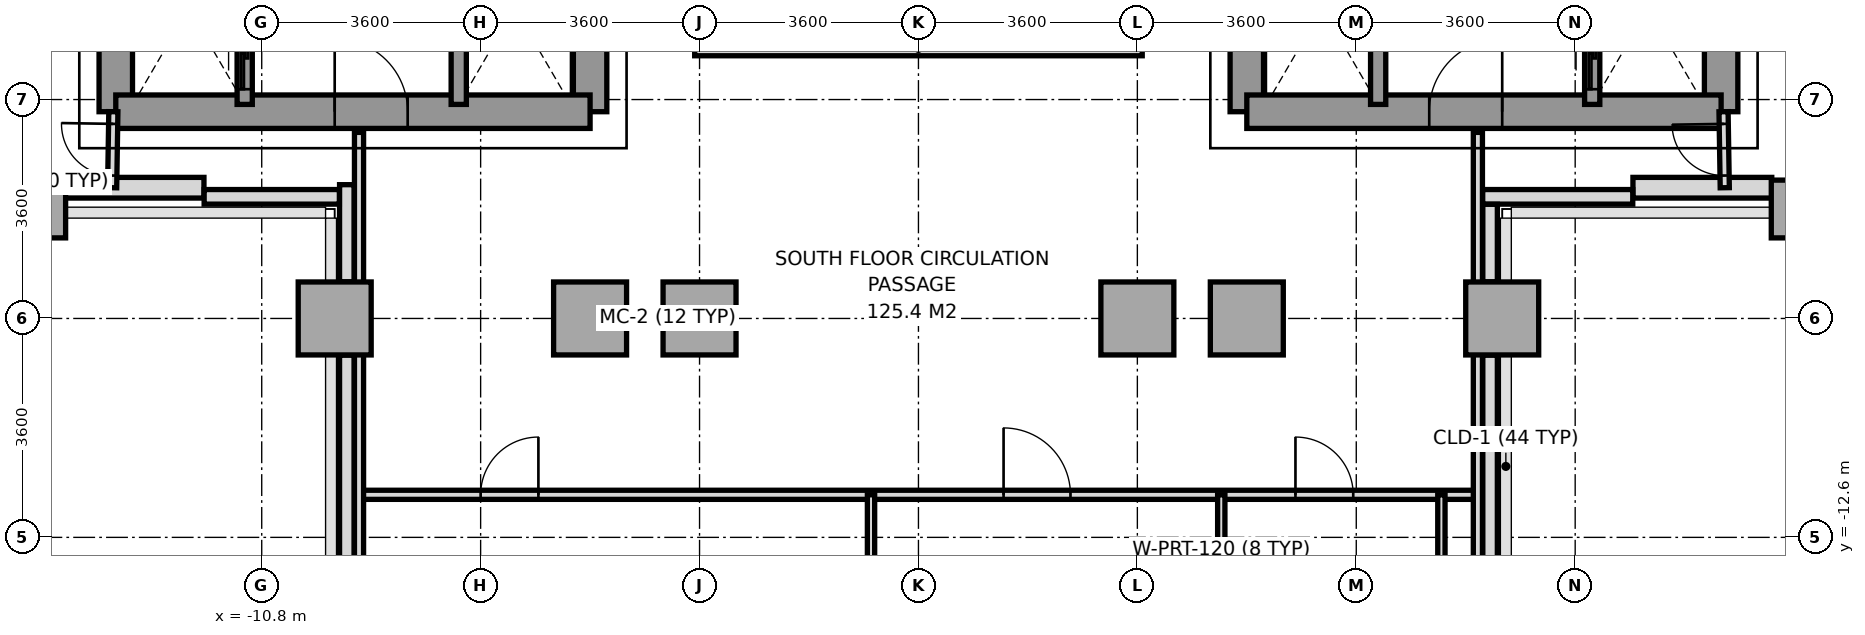
"""IFC4 building model, lengths in metres.
Left out: names, types, materials, properties, quantities, classifications, styles, units other than length and angle.
Written with IfcOpenShell. Run it as: python <this file> out.ifc"""

import sys

from ifc_helpers import new_model, si_unit, direction, frame, frame_2d, origin, origin_2d, place, context, subcontext, project, spatial, rectangle, extrude, source, transform, mapped, element, fill, save


model = new_model("IFC4")
c1 = context("Model", 3, precision=1e-05, world=origin(), true_north=direction((0.0, 1.0)))
c2 = subcontext(c1, "Body", "Model", "MODEL_VIEW")
j1 = project(units=[si_unit("LENGTHUNIT", "METRE"), si_unit("PLANEANGLEUNIT", "RADIAN")], contexts=[c1])
p1 = place(None, origin())
s1 = spatial("IfcSite", under=j1, at=p1, CompositionType="ELEMENT")
p2 = place(p1, origin())
s2 = spatial("IfcBuilding", under=s1, at=p2, CompositionType="ELEMENT")
p3 = place(p2, frame((0.0, 0.0, 85.0)))
s3 = spatial("IfcBuildingStorey", under=s2, at=p3, CompositionType="ELEMENT", Elevation=85.0)
m1 = source(origin(), c2, "Body", "SweptSolid", [
    extrude(rectangle(XDim=0.75, YDim=0.95, at=origin_2d()), origin(), (0.0, 0.0, 1.0), 3.14),
])
p4 = place(p3, frame((-14.4, -7.2, 0.0), z_axis=(0.0, 0.0, 1.0), x_axis=(1.0, 0.0, 0.0)))
e1 = element("IfcColumn", 1, at=p4, inside=s3, PredefinedType="COLUMN", context=c2, shape_type="MappedRepresentation", body=[
    mapped(m1, transform((0.0, 0.0, 0.0), x_axis=(1.0, 0.0, 0.0), y_axis=(0.0, 1.0, 0.0), z_axis=(0.0, 0.0, 1.0), scale=1.0)),
])
m2 = source(origin(), c2, "Body", "SweptSolid", [
    extrude(rectangle(XDim=1.2, YDim=1.2, at=origin_2d()), origin(), (0.0, 0.0, 1.0), 3.14),
])
for number, where, z_axis, x_axis in (
    (2, (-9.6, -9.0, 0.0), (0.0, 0.0, 1.0), (1.0, 0.0, 0.0)),
    (3, (-5.4, -9.0, 0.0), (0.0, 0.0, 1.0), (1.0, 0.0, 0.0)),
    (4, (-3.6, -9.0, 0.0), (0.0, 0.0, 1.0), (1.0, 0.0, 0.0)),
    (5, (3.6, -9.0, 0.0), (0.0, 0.0, 1.0), (1.0, 0.0, 0.0)),
    (6, (5.4, -9.0, 0.0), (0.0, 0.0, 1.0), (1.0, 0.0, 0.0)),
    (7, (9.6, -9.0, 0.0), (0.0, 0.0, 1.0), (1.0, 0.0, 0.0)),
):
    element("IfcColumn", number, at=place(p3, frame(where, z_axis=z_axis, x_axis=x_axis)), inside=s3, PredefinedType="COLUMN", context=c2, shape_type="MappedRepresentation", body=[
        mapped(m2, transform((0.0, 0.0, 0.0), x_axis=(1.0, 0.0, 0.0), y_axis=(0.0, 1.0, 0.0), z_axis=(0.0, 0.0, 1.0), scale=1.0)),
    ])
p5 = place(p3, frame((14.4, -7.2, 0.0), z_axis=(0.0, 0.0, 1.0), x_axis=(1.0, 0.0, 0.0)))
e8 = element("IfcColumn", 8, at=p5, inside=s3, PredefinedType="COLUMN", context=c2, shape_type="MappedRepresentation", body=[
    mapped(m1, transform((0.0, 0.0, 0.0), x_axis=(1.0, 0.0, 0.0), y_axis=(0.0, 1.0, 0.0), z_axis=(0.0, 0.0, 1.0), scale=1.0)),
])
for number, where, z_axis, x_axis in (
    (9, (-14.033, -6.85, 0.0), (0.0, 0.0, 1.0), (1.0, 0.0, 0.0)),
    (10, (11.75, -6.85, 0.0), (0.0, 0.0, 1.0), (1.0, 0.0, 0.0)),
):
    element("IfcWall", number, at=place(p3, frame(where, z_axis=z_axis, x_axis=x_axis)), inside=s3, PredefinedType="SOLIDWALL", context=c2, shape_type="SweptSolid", body=[
        extrude(rectangle(XDim=2.283, YDim=0.34, at=frame_2d((1.142, 0.0))), origin(), (0.0, 0.0, 1.0), 3.14),
    ])
p6 = place(p3, frame((11.747, -7.0, 0.0), z_axis=(0.0, 0.0, 1.0), x_axis=(-1.0, 0.0, 0.0)))
e11 = element("IfcWall", 11, at=p6, inside=s3, PredefinedType="PARAPET", context=c2, shape_type="SweptSolid", body=[
    extrude(rectangle(XDim=2.469, YDim=0.24, at=frame_2d((1.234, 0.0))), origin(), (0.0, 0.0, 1.0), 1.15),
])
p7 = place(p3, frame((9.4, -7.123, 0.0), z_axis=(0.0, 0.0, 1.0), x_axis=(0.0, -1.0, 0.0)))
e12 = element("IfcWall", 12, at=p7, inside=s3, PredefinedType="PARAPET", context=c2, shape_type="SweptSolid", body=[
    extrude(rectangle(XDim=1.274, YDim=0.24, at=frame_2d((0.637, 0.0))), origin(), (0.0, 0.0, 1.0), 1.15),
])
p8 = place(p3, frame((9.4, -9.603, 0.0), z_axis=(0.0, 0.0, 1.0), x_axis=(0.0, -1.0, 0.0)))
e13 = element("IfcWall", 13, at=p8, inside=s3, PredefinedType="PARAPET", context=c2, shape_type="SweptSolid", body=[
    extrude(rectangle(XDim=6.0, YDim=0.24, at=frame_2d((3.0, 0.0))), origin(), (0.0, 0.0, 1.0), 1.15),
])
p9 = place(p3, frame((-9.4, -15.358, 0.0), z_axis=(0.0, 0.0, 1.0), x_axis=(0.0, 1.0, 0.0)))
e14 = element("IfcWall", 14, at=p9, inside=s3, PredefinedType="PARAPET", context=c2, shape_type="SweptSolid", body=[
    extrude(rectangle(XDim=5.755, YDim=0.24, at=frame_2d((2.877, 0.0))), origin(), (0.0, 0.0, 1.0), 1.15),
])
p10 = place(p3, frame((-9.4, -8.397, 0.0), z_axis=(0.0, 0.0, 1.0), x_axis=(0.0, 1.0, 0.0)))
e15 = element("IfcWall", 15, at=p10, inside=s3, PredefinedType="PARAPET", context=c2, shape_type="SweptSolid", body=[
    extrude(rectangle(XDim=1.597, YDim=0.24, at=frame_2d((0.798, 0.0))), origin(), (0.0, 0.0, 1.0), 1.15),
])
p11 = place(p3, frame((-9.523, -7.0, 0.0), z_axis=(0.0, 0.0, 1.0), x_axis=(-1.0, 0.0, 0.0)))
e16 = element("IfcWall", 16, at=p11, inside=s3, PredefinedType="PARAPET", context=c2, shape_type="SweptSolid", body=[
    extrude(rectangle(XDim=2.224, YDim=0.24, at=frame_2d((1.112, 0.0))), origin(), (0.0, 0.0, 1.0), 1.15),
])
p12 = place(p3, frame((-13.2, -5.6, 0.0), z_axis=(0.0, 0.0, 1.0), x_axis=(0.0, 1.0, 0.0)))
e17 = element("IfcWall", 17, at=p12, inside=s3, PredefinedType="SHEAR", context=c2, shape_type="SweptSolid", body=[
    extrude(rectangle(XDim=11.2, YDim=0.55, at=frame_2d((5.6, 0.0))), origin(), (0.0, 0.0, 1.0), 3.14),
])
p13 = place(p3, frame((-5.4, -5.6, 0.0), z_axis=(0.0, 0.0, 1.0), x_axis=(0.0, 1.0, 0.0)))
e18 = element("IfcWall", 18, at=p13, inside=s3, PredefinedType="SHEAR", context=c2, shape_type="SweptSolid", body=[
    extrude(rectangle(XDim=12.5, YDim=0.55, at=frame_2d((6.25, 0.0))), origin(), (0.0, 0.0, 1.0), 3.14),
])
p14 = place(p13, frame((4.55, 0.0, 0.0)))
e19 = element("IfcOpeningElement", 19, at=p14, cuts=e18, PredefinedType="OPENING", context=c2, shape_type="SweptSolid", body=[
    extrude(rectangle(XDim=1.2, YDim=2.2, at=frame_2d((0.6, 1.1))), frame((0.0, 0.285, 0.0), z_axis=(0.0, -1.0, 0.0), x_axis=(1.0, 0.0, 0.0)), (0.0, 0.0, 1.0), 0.57),
])
p15 = place(p13, frame((6.86, 0.0, 0.0)))
e20 = element("IfcOpeningElement", 20, at=p15, cuts=e18, PredefinedType="OPENING", context=c2, shape_type="SweptSolid", body=[
    extrude(rectangle(XDim=0.8, YDim=2.1, at=frame_2d((0.4, 1.05))), frame((0.0, 0.285, 0.0), z_axis=(0.0, -1.0, 0.0), x_axis=(1.0, 0.0, 0.0)), (0.0, 0.0, 1.0), 0.57),
])
p16 = place(p13, frame((7.88, 0.0, 0.0)))
e21 = element("IfcOpeningElement", 21, at=p16, cuts=e18, PredefinedType="OPENING", context=c2, shape_type="SweptSolid", body=[
    extrude(rectangle(XDim=0.8, YDim=2.1, at=frame_2d((0.4, 1.05))), frame((0.0, 0.285, 0.0), z_axis=(0.0, -1.0, 0.0), x_axis=(1.0, 0.0, 0.0)), (0.0, 0.0, 1.0), 0.57),
])
p17 = place(p3, frame((-13.2, -5.6, 0.0), z_axis=(0.0, 0.0, 1.0), x_axis=(1.0, 0.0, 0.0)))
e22 = element("IfcWall", 22, at=p17, inside=s3, PredefinedType="SHEAR", context=c2, shape_type="SweptSolid", body=[
    extrude(rectangle(XDim=7.8, YDim=0.55, at=frame_2d((3.9, 0.0))), origin(), (0.0, 0.0, 1.0), 3.14),
])
p18 = place(p17, frame((3.6, 0.0, 0.0)))
e23 = element("IfcOpeningElement", 23, at=p18, cuts=e22, PredefinedType="OPENING", context=c2, shape_type="SweptSolid", body=[
    extrude(rectangle(XDim=1.2, YDim=2.2, at=frame_2d((0.6, 1.1))), frame((0.0, 0.285, 0.0), z_axis=(0.0, -1.0, 0.0), x_axis=(1.0, 0.0, 0.0)), (0.0, 0.0, 1.0), 0.57),
])
p19 = place(p3, frame((13.2, -5.6, 0.0), z_axis=(0.0, 0.0, 1.0), x_axis=(0.0, 1.0, 0.0)))
e24 = element("IfcWall", 24, at=p19, inside=s3, PredefinedType="SHEAR", context=c2, shape_type="SweptSolid", body=[
    extrude(rectangle(XDim=11.2, YDim=0.55, at=frame_2d((5.6, 0.0))), origin(), (0.0, 0.0, 1.0), 3.14),
])
p20 = place(p3, frame((5.4, -5.6, 0.0), z_axis=(0.0, 0.0, 1.0), x_axis=(0.0, 1.0, 0.0)))
e25 = element("IfcWall", 25, at=p20, inside=s3, PredefinedType="SHEAR", context=c2, shape_type="SweptSolid", body=[
    extrude(rectangle(XDim=12.5, YDim=0.55, at=frame_2d((6.25, 0.0))), origin(), (0.0, 0.0, 1.0), 3.14),
])
p21 = place(p20, frame((4.55, 0.0, 0.0)))
e26 = element("IfcOpeningElement", 26, at=p21, cuts=e25, PredefinedType="OPENING", context=c2, shape_type="SweptSolid", body=[
    extrude(rectangle(XDim=1.2, YDim=2.2, at=frame_2d((0.6, 1.1))), frame((0.0, 0.285, 0.0), z_axis=(0.0, -1.0, 0.0), x_axis=(1.0, 0.0, 0.0)), (0.0, 0.0, 1.0), 0.57),
])
p22 = place(p3, frame((5.4, -5.6, 0.0), z_axis=(0.0, 0.0, 1.0), x_axis=(1.0, 0.0, 0.0)))
e27 = element("IfcWall", 27, at=p22, inside=s3, PredefinedType="SHEAR", context=c2, shape_type="SweptSolid", body=[
    extrude(rectangle(XDim=7.8, YDim=0.55, at=frame_2d((3.9, 0.0))), origin(), (0.0, 0.0, 1.0), 3.14),
])
p23 = place(p22, frame((3.0, 0.0, 0.0)))
e28 = element("IfcOpeningElement", 28, at=p23, cuts=e27, PredefinedType="OPENING", context=c2, shape_type="SweptSolid", body=[
    extrude(rectangle(XDim=1.2, YDim=2.2, at=frame_2d((0.6, 1.1))), frame((0.0, 0.285, 0.0), z_axis=(0.0, -1.0, 0.0), x_axis=(1.0, 0.0, 0.0)), (0.0, 0.0, 1.0), 0.57),
])
p24 = place(p3, frame((-11.08, -5.48, 0.0), z_axis=(0.0, 0.0, 1.0), x_axis=(0.0, 1.0, 0.0)))
e29 = element("IfcWall", 29, at=p24, inside=s3, PredefinedType="SOLIDWALL", context=c2, shape_type="SweptSolid", body=[
    extrude(rectangle(XDim=1.6, YDim=0.25, at=frame_2d((0.8, 0.0))), origin(), (0.0, 0.0, 1.0), 3.14),
])
p25 = place(p24, frame((0.25, 0.0, 0.0)))
e30 = element("IfcOpeningElement", 30, at=p25, cuts=e29, PredefinedType="OPENING", context=c2, shape_type="SweptSolid", body=[
    extrude(rectangle(XDim=1.1, YDim=2.2, at=frame_2d((0.55, 1.1))), frame((0.0, 0.135, 0.0), z_axis=(0.0, -1.0, 0.0), x_axis=(1.0, 0.0, 0.0)), (0.0, 0.0, 1.0), 0.27),
])
p26 = place(p3, frame((11.08, -5.48, 0.0), z_axis=(0.0, 0.0, 1.0), x_axis=(0.0, 1.0, 0.0)))
e31 = element("IfcWall", 31, at=p26, inside=s3, PredefinedType="SOLIDWALL", context=c2, shape_type="SweptSolid", body=[
    extrude(rectangle(XDim=1.6, YDim=0.25, at=frame_2d((0.8, 0.0))), origin(), (0.0, 0.0, 1.0), 3.14),
])
p27 = place(p26, frame((0.25, 0.0, 0.0)))
e32 = element("IfcOpeningElement", 32, at=p27, cuts=e31, PredefinedType="OPENING", context=c2, shape_type="SweptSolid", body=[
    extrude(rectangle(XDim=1.1, YDim=2.2, at=frame_2d((0.55, 1.1))), frame((0.0, 0.135, 0.0), z_axis=(0.0, -1.0, 0.0), x_axis=(1.0, 0.0, 0.0)), (0.0, 0.0, 1.0), 0.27),
])
for number, where, z_axis, x_axis in (
    (33, (-7.56, -5.48, 0.0), (0.0, 0.0, 1.0), (0.0, 1.0, 0.0)),
    (34, (7.56, -5.48, 0.0), (0.0, 0.0, 1.0), (0.0, 1.0, 0.0)),
):
    element("IfcWall", number, at=place(p3, frame(where, z_axis=z_axis, x_axis=x_axis)), inside=s3, PredefinedType="SOLIDWALL", context=c2, shape_type="SweptSolid", body=[
        extrude(rectangle(XDim=1.6, YDim=0.25, at=frame_2d((0.8, 0.0))), origin(), (0.0, 0.0, 1.0), 3.14),
    ])
p28 = place(p3, frame((-9.2, -11.9, 0.0), z_axis=(0.0, 0.0, 1.0), x_axis=(1.0, 0.0, 0.0)))
e35 = element("IfcWall", 35, at=p28, inside=s3, PredefinedType="PARTITIONING", context=c2, shape_type="SweptSolid", body=[
    extrude(rectangle(XDim=18.4, YDim=0.15, at=frame_2d((9.2, 0.0))), origin(), (0.0, 0.0, 1.0), 3.14),
])
p29 = place(p28, frame((15.4, 0.0, 0.0)))
e36 = element("IfcOpeningElement", 36, at=p29, cuts=e35, PredefinedType="OPENING", context=c2, shape_type="SweptSolid", body=[
    extrude(rectangle(XDim=0.95, YDim=2.15, at=frame_2d((0.475, 1.075))), frame((0.0, 0.085, 0.0), z_axis=(0.0, -1.0, 0.0), x_axis=(1.0, 0.0, 0.0)), (0.0, 0.0, 1.0), 0.17),
])
p30 = place(p28, frame((2.0, 0.0, 0.0)))
e37 = element("IfcOpeningElement", 37, at=p30, cuts=e35, PredefinedType="OPENING", context=c2, shape_type="SweptSolid", body=[
    extrude(rectangle(XDim=0.95, YDim=2.15, at=frame_2d((0.475, 1.075))), frame((0.0, 0.085, 0.0), z_axis=(0.0, -1.0, 0.0), x_axis=(1.0, 0.0, 0.0)), (0.0, 0.0, 1.0), 0.17),
])
p31 = place(p28, frame((10.6, 0.0, 0.0)))
e38 = element("IfcOpeningElement", 38, at=p31, cuts=e35, PredefinedType="OPENING", context=c2, shape_type="SweptSolid", body=[
    extrude(rectangle(XDim=1.1, YDim=2.2, at=frame_2d((0.55, 1.1))), frame((0.0, 0.085, 0.0), z_axis=(0.0, -1.0, 0.0), x_axis=(1.0, 0.0, 0.0)), (0.0, 0.0, 1.0), 0.17),
])
for number, where, z_axis, x_axis in (
    (39, (-9.2, -15.68, 0.0), (0.0, 0.0, 1.0), (0.0, 1.0, 0.0)),
    (40, (9.2, -15.68, 0.0), (0.0, 0.0, 1.0), (0.0, 1.0, 0.0)),
):
    element("IfcWall", number, at=place(p3, frame(where, z_axis=z_axis, x_axis=x_axis)), inside=s3, PredefinedType="PARTITIONING", context=c2, shape_type="SweptSolid", body=[
        extrude(rectangle(XDim=9.74, YDim=0.15, at=frame_2d((4.87, 0.0))), origin(), (0.0, 0.0, 1.0), 2.59),
    ])
p32 = place(p3, frame((4.98, -15.4, 0.0), z_axis=(0.0, 0.0, 1.0), x_axis=(0.0, 1.0, 0.0)))
e41 = element("IfcWall", 41, at=p32, inside=s3, PredefinedType="PARTITIONING", context=c2, shape_type="SweptSolid", body=[
    extrude(rectangle(XDim=3.5, YDim=0.12, at=frame_2d((1.75, 0.0))), origin(), (0.0, 0.0, 1.0), 2.59),
])
p33 = place(p3, frame((8.6, -15.4, 0.0), z_axis=(0.0, 0.0, 1.0), x_axis=(0.0, 1.0, 0.0)))
e42 = element("IfcWall", 42, at=p33, inside=s3, PredefinedType="PARTITIONING", context=c2, shape_type="SweptSolid", body=[
    extrude(rectangle(XDim=3.5, YDim=0.12, at=frame_2d((1.75, 0.0))), origin(), (0.0, 0.0, 1.0), 3.14),
])
p34 = place(p3, frame((-0.78, -24.65, 0.0), z_axis=(0.0, 0.0, 1.0), x_axis=(0.0, 1.0, 0.0)))
e43 = element("IfcWall", 43, at=p34, inside=s3, PredefinedType="PARTITIONING", context=c2, shape_type="SweptSolid", body=[
    extrude(rectangle(XDim=12.75, YDim=0.12, at=frame_2d((6.375, 0.0))), origin(), (0.0, 0.0, 1.0), 2.59),
])
p35 = place(p3, frame((-13.26, -6.85, 0.0), z_axis=(0.0, 0.0, 1.0), x_axis=(0.016013571389, 0.999871774545, 0.0)))
e44 = element("IfcWall", 44, at=p35, inside=s3, PredefinedType="PARTITIONING", context=c2, shape_type="SweptSolid", body=[
    extrude(rectangle(XDim=1.25, YDim=0.15, at=frame_2d((0.625, 0.0))), origin(), (0.0, 0.0, 1.0), 3.14),
])
p36 = place(p35, frame((0.2, 0.0, 0.0)))
e45 = element("IfcOpeningElement", 45, at=p36, cuts=e44, PredefinedType="OPENING", context=c2, shape_type="SweptSolid", body=[
    extrude(rectangle(XDim=0.85, YDim=2.1, at=frame_2d((0.425, 1.05))), frame((0.0, 0.085, 0.0), z_axis=(0.0, -1.0, 0.0), x_axis=(1.0, 0.0, 0.0)), (0.0, 0.0, 1.0), 0.17),
])
p37 = place(p3, frame((13.26, -6.85, 0.0), z_axis=(0.0, 0.0, 1.0), x_axis=(-0.016013571389, 0.999871774545, 0.0)))
e46 = element("IfcWall", 46, at=p37, inside=s3, PredefinedType="PARTITIONING", context=c2, shape_type="SweptSolid", body=[
    extrude(rectangle(XDim=1.25, YDim=0.15, at=frame_2d((0.625, 0.0))), origin(), (0.0, 0.0, 1.0), 3.14),
])
p38 = place(p37, frame((0.2, 0.0, 0.0)))
e47 = element("IfcOpeningElement", 47, at=p38, cuts=e46, PredefinedType="OPENING", context=c2, shape_type="SweptSolid", body=[
    extrude(rectangle(XDim=0.85, YDim=2.1, at=frame_2d((0.425, 1.05))), frame((0.0, 0.085, 0.0), z_axis=(0.0, -1.0, 0.0), x_axis=(1.0, 0.0, 0.0)), (0.0, 0.0, 1.0), 0.17),
])
p39 = place(p3, frame((-3.68, -4.56, 0.0), z_axis=(0.0, 0.0, 1.0), x_axis=(1.0, 0.0, 0.0)))
e48 = element("IfcWall", 48, at=p39, inside=s3, PredefinedType="PARAPET", context=c2, shape_type="SweptSolid", body=[
    extrude(rectangle(XDim=7.36, YDim=0.24, at=frame_2d((3.68, 0.0))), origin(), (0.0, 0.0, 1.0), 1.15),
])
m3 = source(origin(), c2, "Body", "SweptSolid", [
    extrude(rectangle(XDim=1.2, YDim=2.2, at=frame_2d((0.6, 1.1))), frame((0.0, 0.025, 0.0), z_axis=(0.0, -1.0, 0.0), x_axis=(1.0, 0.0, 0.0)), (0.0, 0.0, 1.0), 0.05),
])
p40 = place(p18, origin())
e49 = element("IfcDoor", 49, at=p40, inside=s3, OperationType="SINGLE_SWING_LEFT", PredefinedType="DOOR", context=c2, shape_type="MappedRepresentation", body=[
    mapped(m3, transform((0.0, 0.0, 0.0), x_axis=(1.0, 0.0, 0.0), y_axis=(0.0, 1.0, 0.0), z_axis=(0.0, 0.0, 1.0), scale=1.0)),
])
fill(e23, e49)
p41 = place(p23, origin())
e50 = element("IfcDoor", 50, at=p41, inside=s3, OperationType="SINGLE_SWING_RIGHT", PredefinedType="DOOR", context=c2, shape_type="MappedRepresentation", body=[
    mapped(m3, transform((0.0, 0.0, 0.0), x_axis=(1.0, 0.0, 0.0), y_axis=(0.0, 1.0, 0.0), z_axis=(0.0, 0.0, 1.0), scale=1.0)),
])
fill(e28, e50)
m4 = source(origin(), c2, "Body", "SweptSolid", [
    extrude(rectangle(XDim=1.1, YDim=2.2, at=frame_2d((0.55, 1.1))), frame((0.0, 0.025, 0.0), z_axis=(0.0, -1.0, 0.0), x_axis=(1.0, 0.0, 0.0)), (0.0, 0.0, 1.0), 0.05),
])
p42 = place(p25, origin())
e51 = element("IfcDoor", 51, at=p42, inside=s3, OperationType="SLIDING_TO_LEFT", PredefinedType="DOOR", context=c2, shape_type="MappedRepresentation", body=[
    mapped(m4, transform((0.0, 0.0, 0.0), x_axis=(1.0, 0.0, 0.0), y_axis=(0.0, 1.0, 0.0), z_axis=(0.0, 0.0, 1.0), scale=1.0)),
])
fill(e30, e51)
p43 = place(p27, origin())
e52 = element("IfcDoor", 52, at=p43, inside=s3, OperationType="SLIDING_TO_LEFT", PredefinedType="DOOR", context=c2, shape_type="MappedRepresentation", body=[
    mapped(m4, transform((0.0, 0.0, 0.0), x_axis=(1.0, 0.0, 0.0), y_axis=(0.0, 1.0, 0.0), z_axis=(0.0, 0.0, 1.0), scale=1.0)),
])
fill(e32, e52)
m5 = source(origin(), c2, "Body", "SweptSolid", [
    extrude(rectangle(XDim=0.95, YDim=2.15, at=frame_2d((0.475, 1.075))), frame((0.0, 0.025, 0.0), z_axis=(0.0, -1.0, 0.0), x_axis=(1.0, 0.0, 0.0)), (0.0, 0.0, 1.0), 0.05),
])
p44 = place(p29, origin())
e53 = element("IfcDoor", 53, at=p44, inside=s3, OperationType="SINGLE_SWING_LEFT", PredefinedType="DOOR", context=c2, shape_type="MappedRepresentation", body=[
    mapped(m5, transform((0.0, 0.0, 0.0), x_axis=(1.0, 0.0, 0.0), y_axis=(0.0, 1.0, 0.0), z_axis=(0.0, 0.0, 1.0), scale=1.0)),
])
fill(e36, e53)
p45 = place(p30, origin())
e54 = element("IfcDoor", 54, at=p45, inside=s3, OperationType="SINGLE_SWING_RIGHT", PredefinedType="DOOR", context=c2, shape_type="MappedRepresentation", body=[
    mapped(m5, transform((0.0, 0.0, 0.0), x_axis=(1.0, 0.0, 0.0), y_axis=(0.0, 1.0, 0.0), z_axis=(0.0, 0.0, 1.0), scale=1.0)),
])
fill(e37, e54)
p46 = place(p31, origin())
e55 = element("IfcDoor", 55, at=p46, inside=s3, OperationType="SINGLE_SWING_LEFT", PredefinedType="DOOR", context=c2, shape_type="MappedRepresentation", body=[
    mapped(m4, transform((0.0, 0.0, 0.0), x_axis=(1.0, 0.0, 0.0), y_axis=(0.0, 1.0, 0.0), z_axis=(0.0, 0.0, 1.0), scale=1.0)),
])
fill(e38, e55)
m6 = source(origin(), c2, "Body", "SweptSolid", [
    extrude(rectangle(XDim=0.85, YDim=2.1, at=frame_2d((0.425, 1.05))), frame((0.0, 0.025, 0.0), z_axis=(0.0, -1.0, 0.0), x_axis=(1.0, 0.0, 0.0)), (0.0, 0.0, 1.0), 0.05),
])
p47 = place(p36, origin())
e56 = element("IfcDoor", 56, at=p47, inside=s3, OperationType="SINGLE_SWING_RIGHT", PredefinedType="DOOR", context=c2, shape_type="MappedRepresentation", body=[
    mapped(m6, transform((0.0, 0.0, 0.0), x_axis=(1.0, 0.0, 0.0), y_axis=(0.0, 1.0, 0.0), z_axis=(0.0, 0.0, 1.0), scale=1.0)),
])
fill(e45, e56)
p48 = place(p38, origin())
e57 = element("IfcDoor", 57, at=p48, inside=s3, OperationType="SINGLE_SWING_RIGHT", PredefinedType="DOOR", context=c2, shape_type="MappedRepresentation", body=[
    mapped(m6, transform((0.0, 0.0, 0.0), x_axis=(1.0, 0.0, 0.0), y_axis=(0.0, 1.0, 0.0), z_axis=(0.0, 0.0, 1.0), scale=1.0)),
])
fill(e47, e57)
save(model, sys.argv[1])
